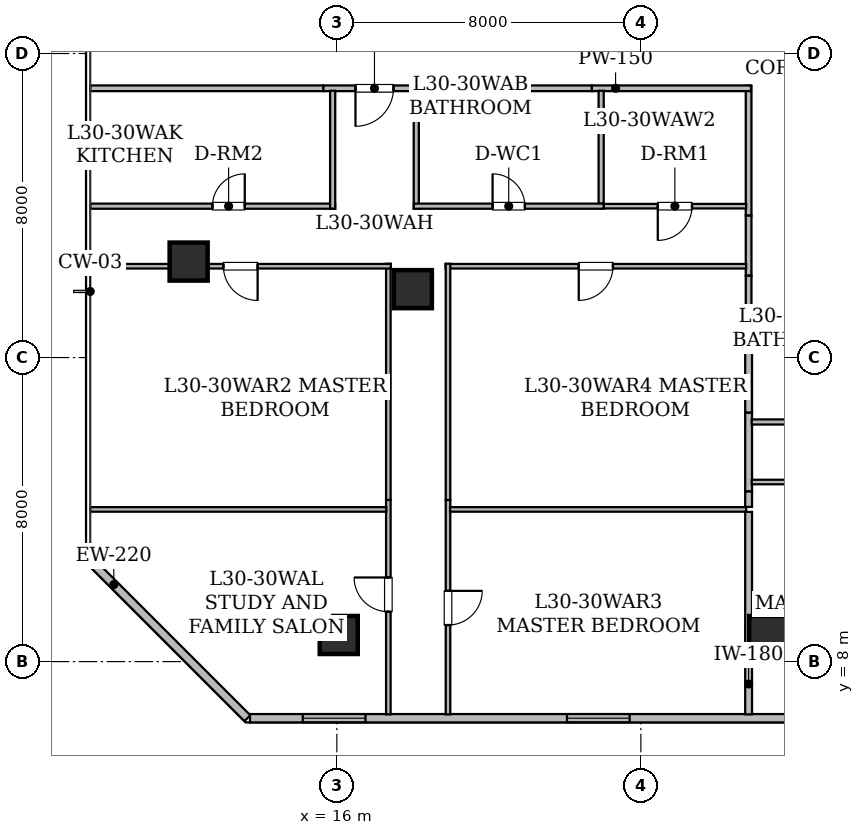
"""IFC4 building model, lengths in metres.
Left out: names, types, materials, properties, quantities, classifications, styles, units other than length and angle.
Written with IfcOpenShell. Run it as: python <this file> out.ifc"""

import sys

from ifc_helpers import new_model, si_unit, direction, frame, frame_2d, origin, origin_2d, place, context, subcontext, project, spatial, rectangle, hollow_rectangle, extrude, element, fill, save


model = new_model("IFC4")
c1 = context("Model", 3, precision=1e-05, world=origin(), true_north=direction((0.0, 1.0)))
c2 = subcontext(c1, "Body", "Model", "MODEL_VIEW")
j1 = project(units=[si_unit("LENGTHUNIT", "METRE"), si_unit("PLANEANGLEUNIT", "RADIAN")], contexts=[c1])
p1 = place(None, origin())
s1 = spatial("IfcSite", under=j1, at=p1, CompositionType="ELEMENT")
p2 = place(p1, origin())
s2 = spatial("IfcBuilding", under=s1, at=p2, CompositionType="ELEMENT")
p3 = place(p2, frame((0.0, 0.0, 120.15)))
s3 = spatial("IfcBuildingStorey", under=s2, at=p3, CompositionType="ELEMENT", Elevation=120.15)
for number, where, z_axis, x_axis in (
    (1, (16.05, 8.7, 0.0), (0.0, 0.0, 1.0), (1.0, 0.0, 0.0)),
    (2, (27.35, 8.7, 0.0), (0.0, 0.0, 1.0), (1.0, 0.0, 0.0)),
    (3, (12.1, 18.525, 0.0), (0.0, 0.0, 1.0), (1.0, 0.0, 0.0)),
    (4, (18.0, 17.8, 0.0), (0.0, 0.0, 1.0), (1.0, 0.0, 0.0)),
):
    element("IfcColumn", number, at=place(p3, frame(where, z_axis=z_axis, x_axis=x_axis)), inside=s3, PredefinedType="COLUMN", context=c2, shape_type="SweptSolid", body=[
        extrude(hollow_rectangle(XDim=1.0, YDim=1.0, WallThickness=0.05, at=origin_2d()), origin(), (0.0, 0.0, 1.0), 3.65),
    ])
p4 = place(p3, frame((13.646, 6.51, 0.0), z_axis=(0.0, 0.0, 1.0), x_axis=(-0.707106781187, 0.707106781187, 0.0)))
e5 = element("IfcWall", 5, at=p4, inside=s3, PredefinedType="STANDARD", context=c2, shape_type="SweptSolid", body=[
    extrude(rectangle(XDim=5.849, YDim=0.22, at=frame_2d((2.925, 0.0))), origin(), (0.0, 0.0, 1.0), 3.43),
])
p5 = place(p3, frame((52.283, 6.51, 0.0), z_axis=(0.0, 0.0, 1.0), x_axis=(-1.0, 0.0, 0.0)))
e6 = element("IfcWall", 6, at=p5, inside=s3, PredefinedType="STANDARD", context=c2, shape_type="SweptSolid", body=[
    extrude(rectangle(XDim=38.568, YDim=0.22, at=frame_2d((19.284, 0.0))), origin(), (0.0, 0.0, 1.0), 3.43),
])
p6 = place(p5, frame((35.53, 0.0, 0.85)))
e7 = element("IfcOpeningElement", 7, at=p6, cuts=e6, PredefinedType="OPENING", context=c2, shape_type="SweptSolid", body=[
    extrude(rectangle(XDim=1.65, YDim=1.55, at=frame_2d((0.825, 0.775))), frame((0.0, 0.12, 0.0), z_axis=(0.0, -1.0, 0.0), x_axis=(1.0, 0.0, 0.0)), (0.0, 0.0, 1.0), 0.24),
])
p7 = place(p5, frame((28.578, 0.0, 0.85)))
e8 = element("IfcOpeningElement", 8, at=p7, cuts=e6, PredefinedType="OPENING", context=c2, shape_type="SweptSolid", body=[
    extrude(rectangle(XDim=1.65, YDim=1.55, at=frame_2d((0.825, 0.775))), frame((0.0, 0.12, 0.0), z_axis=(0.0, -1.0, 0.0), x_axis=(1.0, 0.0, 0.0)), (0.0, 0.0, 1.0), 0.24),
])
p8 = place(p5, frame((21.362, 0.0, 0.85)))
e9 = element("IfcOpeningElement", 9, at=p8, cuts=e6, PredefinedType="OPENING", context=c2, shape_type="SweptSolid", body=[
    extrude(rectangle(XDim=1.65, YDim=1.55, at=frame_2d((0.825, 0.775))), frame((0.0, 0.12, 0.0), z_axis=(0.0, -1.0, 0.0), x_axis=(1.0, 0.0, 0.0)), (0.0, 0.0, 1.0), 0.24),
])
p9 = place(p5, frame((14.097, 0.0, 0.85)))
e10 = element("IfcOpeningElement", 10, at=p9, cuts=e6, PredefinedType="OPENING", context=c2, shape_type="SweptSolid", body=[
    extrude(rectangle(XDim=1.65, YDim=1.55, at=frame_2d((0.825, 0.775))), frame((0.0, 0.12, 0.0), z_axis=(0.0, -1.0, 0.0), x_axis=(1.0, 0.0, 0.0)), (0.0, 0.0, 1.0), 0.24),
])
p10 = place(p5, frame((1.479, 0.0, 0.85)))
e11 = element("IfcOpeningElement", 11, at=p10, cuts=e6, PredefinedType="OPENING", context=c2, shape_type="SweptSolid", body=[
    extrude(rectangle(XDim=1.65, YDim=1.55, at=frame_2d((0.825, 0.775))), frame((0.0, 0.12, 0.0), z_axis=(0.0, -1.0, 0.0), x_axis=(1.0, 0.0, 0.0)), (0.0, 0.0, 1.0), 0.24),
])
p11 = place(p3, frame((26.835, 19.734, 0.0), z_axis=(0.0, 0.0, 1.0), x_axis=(0.0, 1.0, 0.0)))
e12 = element("IfcWall", 12, at=p11, inside=s3, PredefinedType="STANDARD", context=c2, shape_type="SweptSolid", body=[
    extrude(rectangle(XDim=3.416, YDim=0.15, at=frame_2d((1.708, 0.0))), origin(), (0.0, 0.0, 1.0), 3.43),
])
p12 = place(p3, frame((26.898, 23.085, 0.0), z_axis=(0.0, 0.0, 1.0), x_axis=(-1.0, 0.0, 0.0)))
e13 = element("IfcWall", 13, at=p12, inside=s3, PredefinedType="STANDARD", context=c2, shape_type="SweptSolid", body=[
    extrude(rectangle(XDim=4.192, YDim=0.15, at=frame_2d((2.096, 0.0))), origin(), (0.0, 0.0, 1.0), 3.43),
])
p13 = place(p3, frame((26.835, 18.154, 0.0), z_axis=(0.0, 0.0, 1.0), x_axis=(0.0, 1.0, 0.0)))
e14 = element("IfcWall", 14, at=p13, inside=s3, PredefinedType="STANDARD", context=c2, shape_type="SweptSolid", body=[
    extrude(rectangle(XDim=1.58, YDim=0.15, at=frame_2d((0.79, 0.0))), origin(), (0.0, 0.0, 1.0), 2.647),
])
p14 = place(p3, frame((18.339, 23.085, 0.0), z_axis=(0.0, 0.0, 1.0), x_axis=(-1.0, 0.0, 0.0)))
e15 = element("IfcWall", 15, at=p14, inside=s3, PredefinedType="STANDARD", context=c2, shape_type="SweptSolid", body=[
    extrude(rectangle(XDim=2.698, YDim=0.15, at=frame_2d((1.349, 0.0))), origin(), (0.0, 0.0, 1.0), 2.647),
])
p15 = place(p14, frame((0.849, 0.0, 0.0)))
e16 = element("IfcOpeningElement", 16, at=p15, cuts=e15, PredefinedType="OPENING", context=c2, shape_type="SweptSolid", body=[
    extrude(rectangle(XDim=1.0, YDim=2.15, at=frame_2d((0.5, 1.075))), frame((0.0, 0.085, 0.0), z_axis=(0.0, -1.0, 0.0), x_axis=(1.0, 0.0, 0.0)), (0.0, 0.0, 1.0), 0.17),
])
p16 = place(p3, frame((22.706, 23.085, 0.0), z_axis=(0.0, 0.0, 1.0), x_axis=(-1.0, 0.0, 0.0)))
e17 = element("IfcWall", 17, at=p16, inside=s3, PredefinedType="STANDARD", context=c2, shape_type="SweptSolid", body=[
    extrude(rectangle(XDim=4.367, YDim=0.15, at=frame_2d((2.184, 0.0))), origin(), (0.0, 0.0, 1.0), 3.43),
])
p17 = place(p3, frame((15.641, 23.085, 0.0), z_axis=(0.0, 0.0, 1.0), x_axis=(-1.0, 0.0, 0.0)))
e18 = element("IfcWall", 18, at=p17, inside=s3, PredefinedType="STANDARD", context=c2, shape_type="SweptSolid", body=[
    extrude(rectangle(XDim=6.131, YDim=0.15, at=frame_2d((3.065, 0.0))), origin(), (0.0, 0.0, 1.0), 2.876),
])
p18 = place(p3, frame((26.835, 16.9, 0.0), z_axis=(0.0, 0.0, 1.0), x_axis=(0.0, 1.0, 0.0)))
e19 = element("IfcWall", 19, at=p18, inside=s3, PredefinedType="STANDARD", context=c2, shape_type="SweptSolid", body=[
    extrude(rectangle(XDim=1.254, YDim=0.15, at=frame_2d((0.627, 0.0))), origin(), (0.0, 0.0, 1.0), 3.43),
])
p19 = place(p3, frame((31.601, 16.835, 0.0), z_axis=(0.0, 0.0, 1.0), x_axis=(-1.0, 0.0, 0.0)))
e20 = element("IfcWall", 20, at=p19, inside=s3, PredefinedType="STANDARD", context=c2, shape_type="SweptSolid", body=[
    extrude(rectangle(XDim=4.701, YDim=0.15, at=frame_2d((2.351, 0.0))), origin(), (0.0, 0.0, 1.0), 2.647),
])
p20 = place(p3, frame((26.77, 19.983, 0.0), z_axis=(0.0, 0.0, 1.0), x_axis=(-1.0, 0.0, 0.0)))
e21 = element("IfcWall", 21, at=p20, inside=s3, PredefinedType="PARTITIONING", context=c2, shape_type="SweptSolid", body=[
    extrude(rectangle(XDim=3.75, YDim=0.12, at=frame_2d((1.875, 0.0))), origin(), (0.0, 0.0, 1.0), 3.43),
])
p21 = place(p20, frame((1.425, 0.0, 0.0)))
e22 = element("IfcOpeningElement", 22, at=p21, cuts=e21, PredefinedType="OPENING", context=c2, shape_type="SweptSolid", body=[
    extrude(rectangle(XDim=0.9, YDim=2.1, at=frame_2d((0.45, 1.05))), frame((0.0, 0.07, 0.0), z_axis=(0.0, -1.0, 0.0), x_axis=(1.0, 0.0, 0.0)), (0.0, 0.0, 1.0), 0.14),
])
p22 = place(p3, frame((22.955, 20.048, 0.0), z_axis=(0.0, 0.0, 1.0), x_axis=(0.0, 1.0, 0.0)))
e23 = element("IfcWall", 23, at=p22, inside=s3, PredefinedType="PARTITIONING", context=c2, shape_type="SweptSolid", body=[
    extrude(rectangle(XDim=2.972, YDim=0.135, at=frame_2d((1.486, 0.0))), origin(), (0.0, 0.0, 1.0), 3.43),
])
p23 = place(p3, frame((18.09, 23.02, 0.0), z_axis=(0.0, 0.0, 1.0), x_axis=(0.0, -1.0, 0.0)))
e24 = element("IfcWall", 24, at=p23, inside=s3, PredefinedType="PARTITIONING", context=c2, shape_type="SweptSolid", body=[
    extrude(rectangle(XDim=3.102, YDim=0.135, at=frame_2d((1.551, 0.0))), origin(), (0.0, 0.0, 1.0), 2.647),
])
p24 = place(p3, frame((18.025, 19.983, 0.0), z_axis=(0.0, 0.0, 1.0), x_axis=(1.0, 0.0, 0.0)))
e25 = element("IfcWall", 25, at=p24, inside=s3, PredefinedType="PARTITIONING", context=c2, shape_type="SweptSolid", body=[
    extrude(rectangle(XDim=4.995, YDim=0.135, at=frame_2d((2.498, 0.0))), origin(), (0.0, 0.0, 1.0), 2.647),
])
p25 = place(p24, frame((2.073, 0.0, 0.0)))
e26 = element("IfcOpeningElement", 26, at=p25, cuts=e25, PredefinedType="OPENING", context=c2, shape_type="SweptSolid", body=[
    extrude(rectangle(XDim=0.85, YDim=2.1, at=frame_2d((0.425, 1.05))), frame((0.0, 0.077, 0.0), z_axis=(0.0, -1.0, 0.0), x_axis=(1.0, 0.0, 0.0)), (0.0, 0.0, 1.0), 0.155),
])
p26 = place(p3, frame((9.51, 19.983, 0.0), z_axis=(0.0, 0.0, 1.0), x_axis=(1.0, 0.0, 0.0)))
e27 = element("IfcWall", 27, at=p26, inside=s3, PredefinedType="PARTITIONING", context=c2, shape_type="SweptSolid", body=[
    extrude(rectangle(XDim=6.445, YDim=0.135, at=frame_2d((3.223, 0.0))), origin(), (0.0, 0.0, 1.0), 2.876),
])
p27 = place(p26, frame((3.217, 0.0, 0.0)))
e28 = element("IfcOpeningElement", 28, at=p27, cuts=e27, PredefinedType="OPENING", context=c2, shape_type="SweptSolid", body=[
    extrude(rectangle(XDim=0.85, YDim=2.1, at=frame_2d((0.425, 1.05))), frame((0.0, 0.077, 0.0), z_axis=(0.0, -1.0, 0.0), x_axis=(1.0, 0.0, 0.0)), (0.0, 0.0, 1.0), 0.155),
])
p28 = place(p3, frame((15.89, 19.918, 0.0), z_axis=(0.0, 0.0, 1.0), x_axis=(0.0, 1.0, 0.0)))
e29 = element("IfcWall", 29, at=p28, inside=s3, PredefinedType="PARTITIONING", context=c2, shape_type="SweptSolid", body=[
    extrude(rectangle(XDim=3.102, YDim=0.135, at=frame_2d((1.551, 0.0))), origin(), (0.0, 0.0, 1.0), 3.43),
])
p29 = place(p3, frame((17.355, 6.612, 0.0), z_axis=(0.0, 0.0, 1.0), x_axis=(0.0, 1.0, 0.0)))
e30 = element("IfcWall", 30, at=p29, inside=s3, PredefinedType="PARTITIONING", context=c2, shape_type="SweptSolid", body=[
    extrude(rectangle(XDim=5.642, YDim=0.12, at=frame_2d((2.821, 0.0))), origin(), (0.0, 0.0, 1.0), 2.876),
])
p30 = place(p29, frame((2.701, 0.0, 0.0)))
e31 = element("IfcOpeningElement", 31, at=p30, cuts=e30, PredefinedType="OPENING", context=c2, shape_type="SweptSolid", body=[
    extrude(rectangle(XDim=0.9, YDim=2.1, at=frame_2d((0.45, 1.05))), frame((0.0, 0.07, 0.0), z_axis=(0.0, -1.0, 0.0), x_axis=(1.0, 0.0, 0.0)), (0.0, 0.0, 1.0), 0.14),
])
p31 = place(p3, frame((17.355, 12.254, 0.0), z_axis=(0.0, 0.0, 1.0), x_axis=(0.0, 1.0, 0.0)))
e32 = element("IfcWall", 32, at=p31, inside=s3, PredefinedType="PARTITIONING", context=c2, shape_type="SweptSolid", body=[
    extrude(rectangle(XDim=6.214, YDim=0.12, at=frame_2d((3.107, 0.0))), origin(), (0.0, 0.0, 1.0), 2.647),
])
p32 = place(p3, frame((17.42, 18.403, 0.0), z_axis=(0.0, 0.0, 1.0), x_axis=(-1.0, 0.0, 0.0)))
e33 = element("IfcWall", 33, at=p32, inside=s3, PredefinedType="PARTITIONING", context=c2, shape_type="SweptSolid", body=[
    extrude(rectangle(XDim=7.91, YDim=0.12, at=frame_2d((3.955, 0.0))), origin(), (0.0, 0.0, 1.0), 2.647),
])
p33 = place(p32, frame((3.505, 0.0, 0.0)))
e34 = element("IfcOpeningElement", 34, at=p33, cuts=e33, PredefinedType="OPENING", context=c2, shape_type="SweptSolid", body=[
    extrude(rectangle(XDim=0.9, YDim=2.1, at=frame_2d((0.45, 1.05))), frame((0.0, 0.07, 0.0), z_axis=(0.0, -1.0, 0.0), x_axis=(1.0, 0.0, 0.0)), (0.0, 0.0, 1.0), 0.14),
])
p34 = place(p3, frame((18.925, 12.254, 0.0), z_axis=(0.0, 0.0, 1.0), x_axis=(0.0, -1.0, 0.0)))
e35 = element("IfcWall", 35, at=p34, inside=s3, PredefinedType="PARTITIONING", context=c2, shape_type="SweptSolid", body=[
    extrude(rectangle(XDim=5.642, YDim=0.12, at=frame_2d((2.821, 0.0))), origin(), (0.0, 0.0, 1.0), 2.876),
])
p35 = place(p34, frame((2.393, 0.0, 0.0)))
e36 = element("IfcOpeningElement", 36, at=p35, cuts=e35, PredefinedType="OPENING", context=c2, shape_type="SweptSolid", body=[
    extrude(rectangle(XDim=0.9, YDim=2.1, at=frame_2d((0.45, 1.05))), frame((0.0, 0.07, 0.0), z_axis=(0.0, -1.0, 0.0), x_axis=(1.0, 0.0, 0.0)), (0.0, 0.0, 1.0), 0.14),
])
p36 = place(p3, frame((26.77, 18.403, 0.0), z_axis=(0.0, 0.0, 1.0), x_axis=(-1.0, 0.0, 0.0)))
e37 = element("IfcWall", 37, at=p36, inside=s3, PredefinedType="PARTITIONING", context=c2, shape_type="SweptSolid", body=[
    extrude(rectangle(XDim=7.91, YDim=0.12, at=frame_2d((3.955, 0.0))), origin(), (0.0, 0.0, 1.0), 2.647),
])
p37 = place(p36, frame((3.505, 0.0, 0.0)))
e38 = element("IfcOpeningElement", 38, at=p37, cuts=e37, PredefinedType="OPENING", context=c2, shape_type="SweptSolid", body=[
    extrude(rectangle(XDim=0.9, YDim=2.1, at=frame_2d((0.45, 1.05))), frame((0.0, 0.07, 0.0), z_axis=(0.0, -1.0, 0.0), x_axis=(1.0, 0.0, 0.0)), (0.0, 0.0, 1.0), 0.14),
])
p38 = place(p3, frame((18.925, 18.468, 0.0), z_axis=(0.0, 0.0, 1.0), x_axis=(0.0, -1.0, 0.0)))
e39 = element("IfcWall", 39, at=p38, inside=s3, PredefinedType="PARTITIONING", context=c2, shape_type="SweptSolid", body=[
    extrude(rectangle(XDim=6.214, YDim=0.12, at=frame_2d((3.107, 0.0))), origin(), (0.0, 0.0, 1.0), 2.647),
])
p39 = place(p3, frame((9.51, 12.004, 0.0), z_axis=(0.0, 0.0, 1.0), x_axis=(1.0, 0.0, 0.0)))
e40 = element("IfcWall", 40, at=p39, inside=s3, PredefinedType="PARTITIONING", context=c2, shape_type="SweptSolid", body=[
    extrude(rectangle(XDim=7.791, YDim=0.12, at=frame_2d((3.896, 0.0))), origin(), (0.0, 0.0, 1.0), 2.647),
])
p40 = place(p3, frame((18.979, 12.004, 0.0), z_axis=(0.0, 0.0, 1.0), x_axis=(1.0, 0.0, 0.0)))
e41 = element("IfcWall", 41, at=p40, inside=s3, PredefinedType="PARTITIONING", context=c2, shape_type="SweptSolid", body=[
    extrude(rectangle(XDim=7.791, YDim=0.12, at=frame_2d((3.896, 0.0))), origin(), (0.0, 0.0, 1.0), 3.43),
])
p41 = place(p3, frame((26.835, 11.939, 0.0), z_axis=(0.0, 0.0, 1.0), x_axis=(0.0, -1.0, 0.0)))
e42 = element("IfcWall", 42, at=p41, inside=s3, PredefinedType="STANDARD", context=c2, shape_type="SweptSolid", body=[
    extrude(rectangle(XDim=5.327, YDim=0.18, at=frame_2d((2.664, 0.0))), origin(), (0.0, 0.0, 1.0), 2.876),
])
p42 = place(p3, frame((26.835, 14.554, 0.0), z_axis=(0.0, 0.0, 1.0), x_axis=(0.0, -1.0, 0.0)))
e43 = element("IfcWall", 43, at=p42, inside=s3, PredefinedType="STANDARD", context=c2, shape_type="SweptSolid", body=[
    extrude(rectangle(XDim=2.078, YDim=0.18, at=frame_2d((1.039, 0.0))), origin(), (0.0, 0.0, 1.0), 3.43),
])
p43 = place(p3, frame((26.835, 16.9, 0.0), z_axis=(0.0, 0.0, 1.0), x_axis=(0.0, -1.0, 0.0)))
e44 = element("IfcWall", 44, at=p43, inside=s3, PredefinedType="STANDARD", context=c2, shape_type="SweptSolid", body=[
    extrude(rectangle(XDim=2.346, YDim=0.18, at=frame_2d((1.173, 0.0))), origin(), (0.0, 0.0, 1.0), 3.43),
])
p44 = place(p3, frame((26.835, 12.476, 0.0), z_axis=(0.0, 0.0, 1.0), x_axis=(0.0, -1.0, 0.0)))
e45 = element("IfcWall", 45, at=p44, inside=s3, PredefinedType="STANDARD", context=c2, shape_type="SweptSolid", body=[
    extrude(rectangle(XDim=0.407, YDim=0.18, at=frame_2d((0.204, 0.0))), origin(), (0.0, 0.0, 1.0), 3.43),
])
p45 = place(p3, frame((26.917, 14.305, 0.0), z_axis=(0.0, 0.0, 1.0), x_axis=(1.0, 0.0, 0.0)))
e46 = element("IfcWall", 46, at=p45, inside=s3, PredefinedType="PARTITIONING", context=c2, shape_type="SweptSolid", body=[
    extrude(rectangle(XDim=4.998, YDim=0.135, at=frame_2d((2.499, 0.0))), origin(), (0.0, 0.0, 1.0), 2.647),
])
p46 = place(p45, frame((2.074, 0.0, 0.0)))
e47 = element("IfcOpeningElement", 47, at=p46, cuts=e46, PredefinedType="OPENING", context=c2, shape_type="SweptSolid", body=[
    extrude(rectangle(XDim=0.85, YDim=2.1, at=frame_2d((0.425, 1.05))), frame((0.0, 0.077, 0.0), z_axis=(0.0, -1.0, 0.0), x_axis=(1.0, 0.0, 0.0)), (0.0, 0.0, 1.0), 0.155),
])
p47 = place(p3, frame((33.607, 12.725, 0.0), z_axis=(0.0, 0.0, 1.0), x_axis=(-1.0, 0.0, 0.0)))
e48 = element("IfcWall", 48, at=p47, inside=s3, PredefinedType="PARTITIONING", context=c2, shape_type="SweptSolid", body=[
    extrude(rectangle(XDim=6.69, YDim=0.12, at=frame_2d((3.345, 0.0))), origin(), (0.0, 0.0, 1.0), 2.647),
])
p48 = place(p47, frame((2.917, 0.0, 0.0)))
e49 = element("IfcOpeningElement", 49, at=p48, cuts=e48, PredefinedType="OPENING", context=c2, shape_type="SweptSolid", body=[
    extrude(rectangle(XDim=0.9, YDim=2.1, at=frame_2d((0.45, 1.05))), frame((0.0, 0.07, 0.0), z_axis=(0.0, -1.0, 0.0), x_axis=(1.0, 0.0, 0.0)), (0.0, 0.0, 1.0), 0.14),
])
p49 = place(p6, origin())
e50 = element("IfcWindow", 50, at=p49, inside=s3, PartitioningType="SINGLE_PANEL", PredefinedType="WINDOW", context=c2, shape_type="SweptSolid", body=[
    extrude(rectangle(XDim=1.65, YDim=1.55, at=frame_2d((0.825, 0.775))), frame((0.0, 0.03, 0.0), z_axis=(0.0, -1.0, 0.0), x_axis=(1.0, 0.0, 0.0)), (0.0, 0.0, 1.0), 0.06),
])
fill(e7, e50)
p50 = place(p7, origin())
e51 = element("IfcWindow", 51, at=p50, inside=s3, PartitioningType="SINGLE_PANEL", PredefinedType="WINDOW", context=c2, shape_type="SweptSolid", body=[
    extrude(rectangle(XDim=1.65, YDim=1.55, at=frame_2d((0.825, 0.775))), frame((0.0, 0.03, 0.0), z_axis=(0.0, -1.0, 0.0), x_axis=(1.0, 0.0, 0.0)), (0.0, 0.0, 1.0), 0.06),
])
fill(e8, e51)
p51 = place(p15, origin())
e52 = element("IfcDoor", 52, at=p51, inside=s3, OperationType="SINGLE_SWING_RIGHT", PredefinedType="DOOR", context=c2, shape_type="SweptSolid", body=[
    extrude(rectangle(XDim=1.0, YDim=2.15, at=frame_2d((0.5, 1.075))), frame((0.0, 0.025, 0.0), z_axis=(0.0, -1.0, 0.0), x_axis=(1.0, 0.0, 0.0)), (0.0, 0.0, 1.0), 0.05),
])
fill(e16, e52)
p52 = place(p21, origin())
e53 = element("IfcDoor", 53, at=p52, inside=s3, OperationType="SINGLE_SWING_RIGHT", PredefinedType="DOOR", context=c2, shape_type="SweptSolid", body=[
    extrude(rectangle(XDim=0.9, YDim=2.1, at=frame_2d((0.45, 1.05))), frame((0.0, 0.025, 0.0), z_axis=(0.0, -1.0, 0.0), x_axis=(1.0, 0.0, 0.0)), (0.0, 0.0, 1.0), 0.05),
])
fill(e22, e53)
p53 = place(p25, origin())
e54 = element("IfcDoor", 54, at=p53, inside=s3, OperationType="SINGLE_SWING_LEFT", PredefinedType="DOOR", context=c2, shape_type="SweptSolid", body=[
    extrude(rectangle(XDim=0.85, YDim=2.1, at=frame_2d((0.425, 1.05))), frame((0.0, 0.025, 0.0), z_axis=(0.0, -1.0, 0.0), x_axis=(1.0, 0.0, 0.0)), (0.0, 0.0, 1.0), 0.05),
])
fill(e26, e54)
p54 = place(p27, origin())
e55 = element("IfcDoor", 55, at=p54, inside=s3, OperationType="SINGLE_SWING_RIGHT", PredefinedType="DOOR", context=c2, shape_type="SweptSolid", body=[
    extrude(rectangle(XDim=0.85, YDim=2.1, at=frame_2d((0.425, 1.05))), frame((0.0, 0.025, 0.0), z_axis=(0.0, -1.0, 0.0), x_axis=(1.0, 0.0, 0.0)), (0.0, 0.0, 1.0), 0.05),
])
fill(e28, e55)
p55 = place(p30, origin())
e56 = element("IfcDoor", 56, at=p55, inside=s3, OperationType="SINGLE_SWING_RIGHT", PredefinedType="DOOR", context=c2, shape_type="SweptSolid", body=[
    extrude(rectangle(XDim=0.9, YDim=2.1, at=frame_2d((0.45, 1.05))), frame((0.0, 0.025, 0.0), z_axis=(0.0, -1.0, 0.0), x_axis=(1.0, 0.0, 0.0)), (0.0, 0.0, 1.0), 0.05),
])
fill(e31, e56)
p56 = place(p33, origin())
e57 = element("IfcDoor", 57, at=p56, inside=s3, OperationType="SINGLE_SWING_LEFT", PredefinedType="DOOR", context=c2, shape_type="SweptSolid", body=[
    extrude(rectangle(XDim=0.9, YDim=2.1, at=frame_2d((0.45, 1.05))), frame((0.0, 0.025, 0.0), z_axis=(0.0, -1.0, 0.0), x_axis=(1.0, 0.0, 0.0)), (0.0, 0.0, 1.0), 0.05),
])
fill(e34, e57)
p57 = place(p35, origin())
e58 = element("IfcDoor", 58, at=p57, inside=s3, OperationType="SINGLE_SWING_LEFT", PredefinedType="DOOR", context=c2, shape_type="SweptSolid", body=[
    extrude(rectangle(XDim=0.9, YDim=2.1, at=frame_2d((0.45, 1.05))), frame((0.0, 0.025, 0.0), z_axis=(0.0, -1.0, 0.0), x_axis=(1.0, 0.0, 0.0)), (0.0, 0.0, 1.0), 0.05),
])
fill(e36, e58)
p58 = place(p37, origin())
e59 = element("IfcDoor", 59, at=p58, inside=s3, OperationType="SINGLE_SWING_RIGHT", PredefinedType="DOOR", context=c2, shape_type="SweptSolid", body=[
    extrude(rectangle(XDim=0.9, YDim=2.1, at=frame_2d((0.45, 1.05))), frame((0.0, 0.025, 0.0), z_axis=(0.0, -1.0, 0.0), x_axis=(1.0, 0.0, 0.0)), (0.0, 0.0, 1.0), 0.05),
])
fill(e38, e59)
save(model, sys.argv[1])
